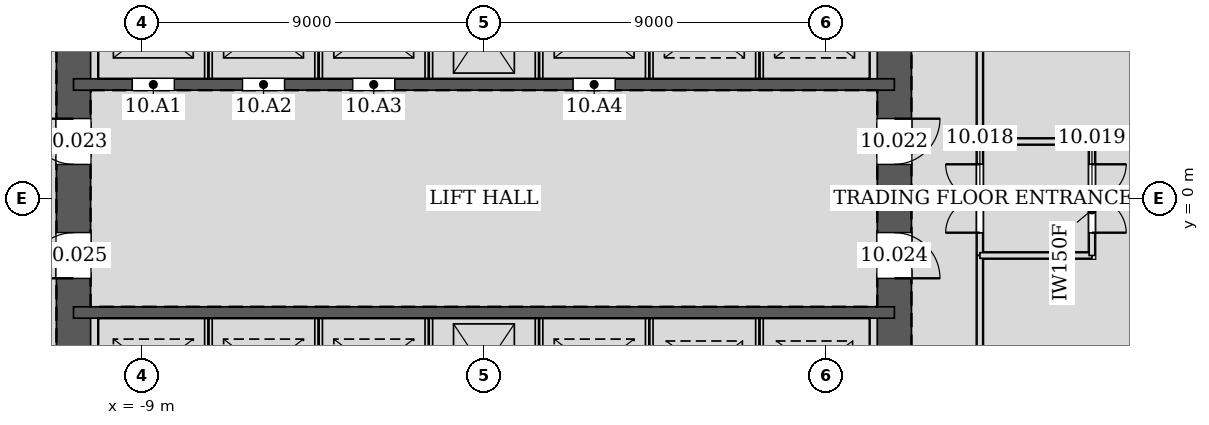
"""IFC4 building model, lengths in metres.
Left out: names, types, materials, properties, quantities, classifications, styles, units other than length and angle.
Written with IfcOpenShell. Run it as: python <this file> out.ifc"""

import sys

from ifc_helpers import new_model, si_unit, direction, frame, frame_2d, origin, place, context, subcontext, project, spatial, rectangle, extrude, element, fill, save


model = new_model("IFC4")
c1 = context("Model", 3, precision=1e-05, world=origin(), true_north=direction((0.0, 1.0)))
c2 = subcontext(c1, "Body", "Model", "MODEL_VIEW")
j1 = project(units=[si_unit("LENGTHUNIT", "METRE"), si_unit("PLANEANGLEUNIT", "RADIAN")], contexts=[c1])
p1 = place(None, origin())
s1 = spatial("IfcSite", under=j1, at=p1, CompositionType="ELEMENT")
p2 = place(p1, origin())
s2 = spatial("IfcBuilding", under=s1, at=p2, CompositionType="ELEMENT")
p3 = place(p2, frame((0.0, 0.0, 49.8)))
s3 = spatial("IfcBuildingStorey", under=s2, at=p3, CompositionType="ELEMENT", Elevation=49.8)
p4 = place(p3, frame((10.8, -10.8, 0.0), z_axis=(0.0, 0.0, 1.0), x_axis=(0.0, 1.0, 0.0)))
e1 = element("IfcWall", 1, at=p4, inside=s3, PredefinedType="SOLIDWALL", context=c2, shape_type="SweptSolid", body=[
    extrude(rectangle(XDim=21.6, YDim=0.9, at=frame_2d((10.8, 0.0))), origin(), (0.0, 0.0, 1.0), 4.2),
])
p5 = place(p4, frame((11.7, 0.0, 0.0)))
e2 = element("IfcOpeningElement", 2, at=p5, cuts=e1, PredefinedType="OPENING", context=c2, shape_type="SweptSolid", body=[
    extrude(rectangle(XDim=1.2, YDim=2.1, at=frame_2d((0.6, 1.05))), frame((0.0, 0.46, 0.0), z_axis=(0.0, -1.0, 0.0), x_axis=(1.0, 0.0, 0.0)), (0.0, 0.0, 1.0), 0.92),
])
p6 = place(p4, frame((8.7, 0.0, 0.0)))
e3 = element("IfcOpeningElement", 3, at=p6, cuts=e1, PredefinedType="OPENING", context=c2, shape_type="SweptSolid", body=[
    extrude(rectangle(XDim=1.2, YDim=2.1, at=frame_2d((0.6, 1.05))), frame((0.0, 0.46, 0.0), z_axis=(0.0, -1.0, 0.0), x_axis=(1.0, 0.0, 0.0)), (0.0, 0.0, 1.0), 0.92),
])
p7 = place(p3, frame((-10.8, 10.8, 0.0), z_axis=(0.0, 0.0, 1.0), x_axis=(0.0, -1.0, 0.0)))
e4 = element("IfcWall", 4, at=p7, inside=s3, PredefinedType="SOLIDWALL", context=c2, shape_type="SweptSolid", body=[
    extrude(rectangle(XDim=21.6, YDim=0.9, at=frame_2d((10.8, 0.0))), origin(), (0.0, 0.0, 1.0), 4.2),
])
p8 = place(p7, frame((8.7, 0.0, 0.0)))
e5 = element("IfcOpeningElement", 5, at=p8, cuts=e4, PredefinedType="OPENING", context=c2, shape_type="SweptSolid", body=[
    extrude(rectangle(XDim=1.2, YDim=2.1, at=frame_2d((0.6, 1.05))), frame((0.0, 0.46, 0.0), z_axis=(0.0, -1.0, 0.0), x_axis=(1.0, 0.0, 0.0)), (0.0, 0.0, 1.0), 0.92),
])
p9 = place(p7, frame((11.7, 0.0, 0.0)))
e6 = element("IfcOpeningElement", 6, at=p9, cuts=e4, PredefinedType="OPENING", context=c2, shape_type="SweptSolid", body=[
    extrude(rectangle(XDim=1.2, YDim=2.1, at=frame_2d((0.6, 1.05))), frame((0.0, 0.46, 0.0), z_axis=(0.0, -1.0, 0.0), x_axis=(1.0, 0.0, 0.0)), (0.0, 0.0, 1.0), 0.92),
])
p10 = place(p3, frame((-10.8, 3.0, 0.0), z_axis=(0.0, 0.0, 1.0), x_axis=(1.0, 0.0, 0.0)))
e7 = element("IfcWall", 7, at=p10, inside=s3, PredefinedType="SOLIDWALL", context=c2, shape_type="SweptSolid", body=[
    extrude(rectangle(XDim=21.6, YDim=0.3, at=frame_2d((10.8, 0.0))), origin(), (0.0, 0.0, 1.0), 4.2),
])
p11 = place(p10, frame((1.55, 0.0, 0.0)))
e8 = element("IfcOpeningElement", 8, at=p11, cuts=e7, PredefinedType="OPENING", context=c2, shape_type="SweptSolid", body=[
    extrude(rectangle(XDim=1.1, YDim=2.1, at=frame_2d((0.55, 1.05))), frame((0.0, 0.16, 0.0), z_axis=(0.0, -1.0, 0.0), x_axis=(1.0, 0.0, 0.0)), (0.0, 0.0, 1.0), 0.32),
])
p12 = place(p10, frame((4.45, 0.0, 0.0)))
e9 = element("IfcOpeningElement", 9, at=p12, cuts=e7, PredefinedType="OPENING", context=c2, shape_type="SweptSolid", body=[
    extrude(rectangle(XDim=1.1, YDim=2.1, at=frame_2d((0.55, 1.05))), frame((0.0, 0.16, 0.0), z_axis=(0.0, -1.0, 0.0), x_axis=(1.0, 0.0, 0.0)), (0.0, 0.0, 1.0), 0.32),
])
p13 = place(p10, frame((7.35, 0.0, 0.0)))
e10 = element("IfcOpeningElement", 10, at=p13, cuts=e7, PredefinedType="OPENING", context=c2, shape_type="SweptSolid", body=[
    extrude(rectangle(XDim=1.1, YDim=2.1, at=frame_2d((0.55, 1.05))), frame((0.0, 0.16, 0.0), z_axis=(0.0, -1.0, 0.0), x_axis=(1.0, 0.0, 0.0)), (0.0, 0.0, 1.0), 0.32),
])
p14 = place(p10, frame((13.15, 0.0, 0.0)))
e11 = element("IfcOpeningElement", 11, at=p14, cuts=e7, PredefinedType="OPENING", context=c2, shape_type="SweptSolid", body=[
    extrude(rectangle(XDim=1.1, YDim=2.1, at=frame_2d((0.55, 1.05))), frame((0.0, 0.16, 0.0), z_axis=(0.0, -1.0, 0.0), x_axis=(1.0, 0.0, 0.0)), (0.0, 0.0, 1.0), 0.32),
])
p15 = place(p3, frame((-10.8, -3.0, 0.0), z_axis=(0.0, 0.0, 1.0), x_axis=(1.0, 0.0, 0.0)))
e12 = element("IfcWall", 12, at=p15, inside=s3, PredefinedType="SOLIDWALL", context=c2, shape_type="SweptSolid", body=[
    extrude(rectangle(XDim=21.6, YDim=0.3, at=frame_2d((10.8, 0.0))), origin(), (0.0, 0.0, 1.0), 4.2),
])
p16 = place(p3, frame((13.05, -1.501, 0.0), z_axis=(0.0, 0.0, 1.0), x_axis=(0.0, 1.0, 0.0)))
e13 = element("IfcWall", 13, at=p16, inside=s3, PredefinedType="PARTITIONING", context=c2, shape_type="SweptSolid", body=[
    extrude(rectangle(XDim=3.002, YDim=0.15, at=frame_2d((1.501, 0.0))), origin(), (0.0, 0.0, 1.0), 2.984),
])
p17 = place(p16, frame((0.601, 0.0, 0.0)))
e14 = element("IfcOpeningElement", 14, at=p17, cuts=e13, PredefinedType="OPENING", context=c2, shape_type="SweptSolid", body=[
    extrude(rectangle(XDim=1.8, YDim=2.4, at=frame_2d((0.9, 1.2))), frame((0.0, 0.085, 0.0), z_axis=(0.0, -1.0, 0.0), x_axis=(1.0, 0.0, 0.0)), (0.0, 0.0, 1.0), 0.17),
])
p18 = place(p3, frame((13.05, -13.05, 0.0), z_axis=(0.0, 0.0, 1.0), x_axis=(0.0, 1.0, 0.0)))
e15 = element("IfcWall", 15, at=p18, inside=s3, PredefinedType="PARTITIONING", context=c2, shape_type="SweptSolid", body=[
    extrude(rectangle(XDim=11.551, YDim=0.15, at=frame_2d((5.775, 0.0))), origin(), (0.0, 0.0, 1.0), 3.014),
])
p19 = place(p3, frame((13.05, 1.499, 0.0), z_axis=(0.0, 0.0, 1.0), x_axis=(0.0, 1.0, 0.0)))
e16 = element("IfcWall", 16, at=p19, inside=s3, PredefinedType="PARTITIONING", context=c2, shape_type="SweptSolid", body=[
    extrude(rectangle(XDim=3.002, YDim=0.15, at=frame_2d((1.501, 0.0))), origin(), (0.0, 0.0, 1.0), 4.035),
])
p20 = place(p3, frame((13.05, -1.5, 0.0), z_axis=(0.0, 0.0, 1.0), x_axis=(1.0, 0.0, 0.0)))
e17 = element("IfcWall", 17, at=p20, inside=s3, PredefinedType="PARTITIONING", context=c2, shape_type="SweptSolid", body=[
    extrude(rectangle(XDim=2.95, YDim=0.15, at=frame_2d((1.475, 0.0))), origin(), (0.0, 0.0, 1.0), 3.423),
])
p21 = place(p3, frame((16.0, -1.5, 0.0), z_axis=(0.0, 0.0, 1.0), x_axis=(0.0, 1.0, 0.0)))
e18 = element("IfcWall", 18, at=p21, inside=s3, PredefinedType="PARTITIONING", context=c2, shape_type="SweptSolid", body=[
    extrude(rectangle(XDim=3.0, YDim=0.15, at=frame_2d((1.5, 0.0))), origin(), (0.0, 0.0, 1.0), 2.984),
])
p22 = place(p21, frame((0.6, 0.0, 0.0)))
e19 = element("IfcOpeningElement", 19, at=p22, cuts=e18, PredefinedType="OPENING", context=c2, shape_type="SweptSolid", body=[
    extrude(rectangle(XDim=1.8, YDim=2.4, at=frame_2d((0.9, 1.2))), frame((0.0, 0.085, 0.0), z_axis=(0.0, -1.0, 0.0), x_axis=(1.0, 0.0, 0.0)), (0.0, 0.0, 1.0), 0.17),
])
p23 = place(p3, frame((16.0, 1.5, 0.0), z_axis=(0.0, 0.0, 1.0), x_axis=(-1.0, 0.0, 0.0)))
e20 = element("IfcWall", 20, at=p23, inside=s3, PredefinedType="PARTITIONING", context=c2, shape_type="SweptSolid", body=[
    extrude(rectangle(XDim=2.95, YDim=0.15, at=frame_2d((1.475, 0.0))), origin(), (0.0, 0.0, 1.0), 3.423),
])
for number, where, z_axis, x_axis in (
    (21, (-7.25, 3.15, 0.0), (0.0, 0.0, 1.0), (0.0, 1.0, 0.0)),
    (22, (-4.35, 3.15, 0.0), (0.0, 0.0, 1.0), (0.0, 1.0, 0.0)),
    (23, (-1.45, 3.15, 0.0), (0.0, 0.0, 1.0), (0.0, 1.0, 0.0)),
    (24, (1.45, 3.15, 0.0), (0.0, 0.0, 1.0), (0.0, 1.0, 0.0)),
    (25, (4.35, 3.15, 0.0), (0.0, 0.0, 1.0), (0.0, 1.0, 0.0)),
    (26, (7.25, 3.15, 0.0), (0.0, 0.0, 1.0), (0.0, 1.0, 0.0)),
    (27, (-7.25, -5.85, 0.0), (0.0, 0.0, 1.0), (0.0, 1.0, 0.0)),
    (28, (-4.35, -5.85, 0.0), (0.0, 0.0, 1.0), (0.0, 1.0, 0.0)),
    (29, (-1.45, -5.85, 0.0), (0.0, 0.0, 1.0), (0.0, 1.0, 0.0)),
    (30, (1.45, -5.85, 0.0), (0.0, 0.0, 1.0), (0.0, 1.0, 0.0)),
    (31, (4.35, -5.85, 0.0), (0.0, 0.0, 1.0), (0.0, 1.0, 0.0)),
    (32, (7.25, -5.85, 0.0), (0.0, 0.0, 1.0), (0.0, 1.0, 0.0)),
):
    element("IfcWall", number, at=place(p3, frame(where, z_axis=z_axis, x_axis=x_axis)), inside=s3, PredefinedType="PARTITIONING", context=c2, shape_type="SweptSolid", body=[
        extrude(rectangle(XDim=2.7, YDim=0.2, at=frame_2d((1.35, 0.0))), origin(), (0.0, 0.0, 1.0), 4.2),
    ])
p24 = place(p17, origin())
e33 = element("IfcDoor", 33, at=p24, inside=s3, OperationType="DOUBLE_DOOR_SINGLE_SWING", PredefinedType="DOOR", context=c2, shape_type="SweptSolid", body=[
    extrude(rectangle(XDim=1.8, YDim=2.4, at=frame_2d((0.9, 1.2))), frame((0.0, 0.025, 0.0), z_axis=(0.0, -1.0, 0.0), x_axis=(1.0, 0.0, 0.0)), (0.0, 0.0, 1.0), 0.05),
])
fill(e14, e33)
p25 = place(p22, frame((1.8, 0.0, 0.0), z_axis=(0.0, 0.0, 1.0), x_axis=(-1.0, 0.0, 0.0)))
e34 = element("IfcDoor", 34, at=p25, inside=s3, OperationType="DOUBLE_DOOR_SINGLE_SWING", PredefinedType="DOOR", context=c2, shape_type="SweptSolid", body=[
    extrude(rectangle(XDim=1.8, YDim=2.4, at=frame_2d((0.9, 1.2))), frame((0.0, 0.025, 0.0), z_axis=(0.0, -1.0, 0.0), x_axis=(1.0, 0.0, 0.0)), (0.0, 0.0, 1.0), 0.05),
])
fill(e19, e34)
p26 = place(p5, frame((1.2, 0.0, 0.0), z_axis=(0.0, 0.0, 1.0), x_axis=(-1.0, 0.0, 0.0)))
e35 = element("IfcDoor", 35, at=p26, inside=s3, OperationType="SINGLE_SWING_LEFT", PredefinedType="DOOR", context=c2, shape_type="SweptSolid", body=[
    extrude(rectangle(XDim=1.2, YDim=2.1, at=frame_2d((0.6, 1.05))), frame((0.0, 0.025, 0.0), z_axis=(0.0, -1.0, 0.0), x_axis=(1.0, 0.0, 0.0)), (0.0, 0.0, 1.0), 0.05),
])
fill(e2, e35)
p27 = place(p8, frame((1.2, 0.0, 0.0), z_axis=(0.0, 0.0, 1.0), x_axis=(-1.0, 0.0, 0.0)))
e36 = element("IfcDoor", 36, at=p27, inside=s3, OperationType="SINGLE_SWING_RIGHT", PredefinedType="DOOR", context=c2, shape_type="SweptSolid", body=[
    extrude(rectangle(XDim=1.2, YDim=2.1, at=frame_2d((0.6, 1.05))), frame((0.0, 0.025, 0.0), z_axis=(0.0, -1.0, 0.0), x_axis=(1.0, 0.0, 0.0)), (0.0, 0.0, 1.0), 0.05),
])
fill(e5, e36)
p28 = place(p6, frame((1.2, 0.0, 0.0), z_axis=(0.0, 0.0, 1.0), x_axis=(-1.0, 0.0, 0.0)))
e37 = element("IfcDoor", 37, at=p28, inside=s3, OperationType="SINGLE_SWING_RIGHT", PredefinedType="DOOR", context=c2, shape_type="SweptSolid", body=[
    extrude(rectangle(XDim=1.2, YDim=2.1, at=frame_2d((0.6, 1.05))), frame((0.0, 0.025, 0.0), z_axis=(0.0, -1.0, 0.0), x_axis=(1.0, 0.0, 0.0)), (0.0, 0.0, 1.0), 0.05),
])
fill(e3, e37)
p29 = place(p9, frame((1.2, 0.0, 0.0), z_axis=(0.0, 0.0, 1.0), x_axis=(-1.0, 0.0, 0.0)))
e38 = element("IfcDoor", 38, at=p29, inside=s3, OperationType="SINGLE_SWING_LEFT", PredefinedType="DOOR", context=c2, shape_type="SweptSolid", body=[
    extrude(rectangle(XDim=1.2, YDim=2.1, at=frame_2d((0.6, 1.05))), frame((0.0, 0.025, 0.0), z_axis=(0.0, -1.0, 0.0), x_axis=(1.0, 0.0, 0.0)), (0.0, 0.0, 1.0), 0.05),
])
fill(e6, e38)
p30 = place(p11, origin())
e39 = element("IfcDoor", 39, at=p30, inside=s3, OperationType="DOUBLE_DOOR_SLIDING", PredefinedType="DOOR", context=c2, shape_type="SweptSolid", body=[
    extrude(rectangle(XDim=1.1, YDim=2.1, at=frame_2d((0.55, 1.05))), frame((0.0, 0.025, 0.0), z_axis=(0.0, -1.0, 0.0), x_axis=(1.0, 0.0, 0.0)), (0.0, 0.0, 1.0), 0.05),
])
fill(e8, e39)
p31 = place(p12, origin())
e40 = element("IfcDoor", 40, at=p31, inside=s3, OperationType="DOUBLE_DOOR_SLIDING", PredefinedType="DOOR", context=c2, shape_type="SweptSolid", body=[
    extrude(rectangle(XDim=1.1, YDim=2.1, at=frame_2d((0.55, 1.05))), frame((0.0, 0.025, 0.0), z_axis=(0.0, -1.0, 0.0), x_axis=(1.0, 0.0, 0.0)), (0.0, 0.0, 1.0), 0.05),
])
fill(e9, e40)
p32 = place(p13, origin())
e41 = element("IfcDoor", 41, at=p32, inside=s3, OperationType="DOUBLE_DOOR_SLIDING", PredefinedType="DOOR", context=c2, shape_type="SweptSolid", body=[
    extrude(rectangle(XDim=1.1, YDim=2.1, at=frame_2d((0.55, 1.05))), frame((0.0, 0.025, 0.0), z_axis=(0.0, -1.0, 0.0), x_axis=(1.0, 0.0, 0.0)), (0.0, 0.0, 1.0), 0.05),
])
fill(e10, e41)
p33 = place(p14, origin())
e42 = element("IfcDoor", 42, at=p33, inside=s3, OperationType="DOUBLE_DOOR_SLIDING", PredefinedType="DOOR", context=c2, shape_type="SweptSolid", body=[
    extrude(rectangle(XDim=1.1, YDim=2.1, at=frame_2d((0.55, 1.05))), frame((0.0, 0.025, 0.0), z_axis=(0.0, -1.0, 0.0), x_axis=(1.0, 0.0, 0.0)), (0.0, 0.0, 1.0), 0.05),
])
fill(e11, e42)
save(model, sys.argv[1])
